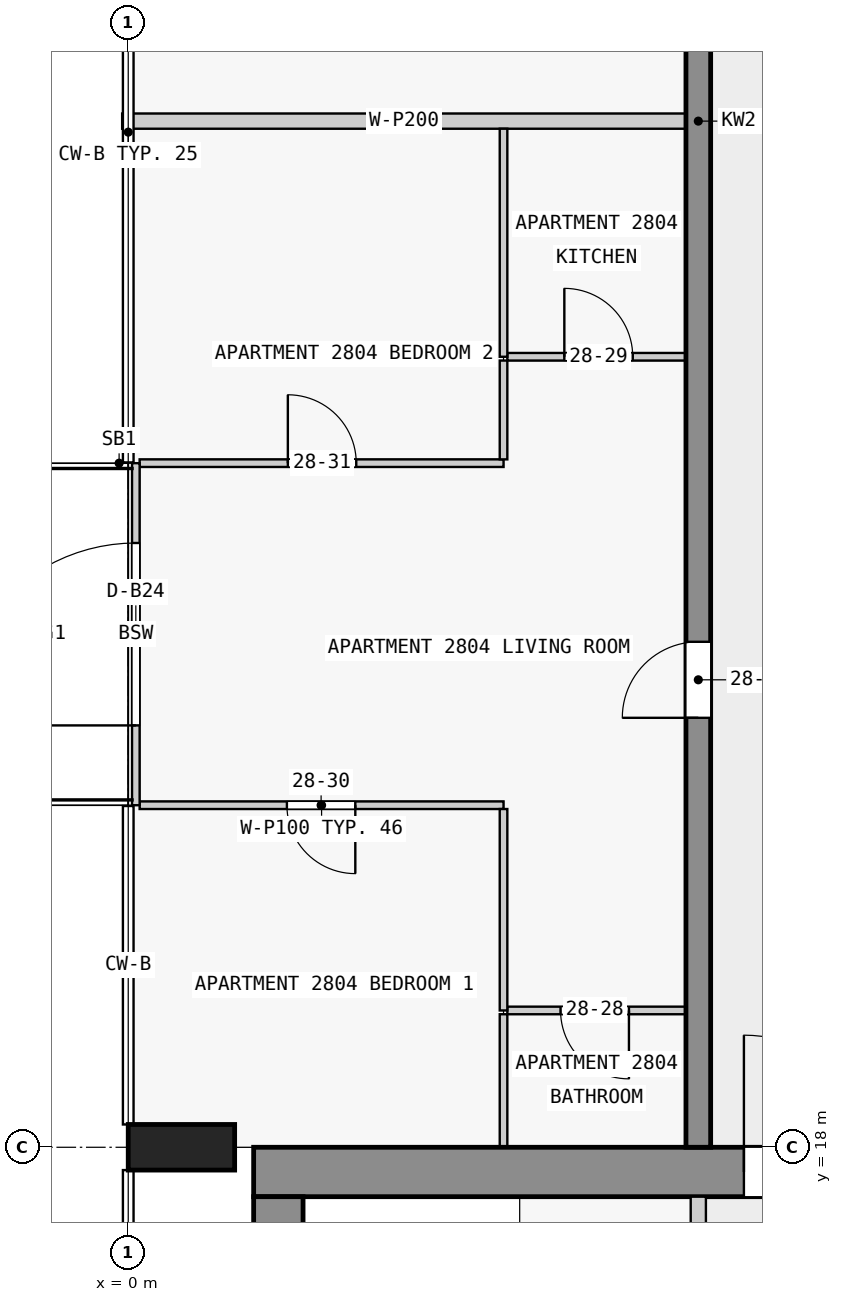
"""IFC4 building model, lengths in metres.
Left out: names, types, materials, properties, quantities, classifications, styles, units other than length and angle.
Written with IfcOpenShell. Run it as: python <this file> out.ifc"""

import sys

from ifc_helpers import new_model, si_unit, direction, frame, frame_2d, origin, origin_2d, place, context, subcontext, project, spatial, rectangle, extrude, element, fill, save


model = new_model("IFC4")
c1 = context("Model", 3, precision=1e-05, world=origin(), true_north=direction((0.0, 1.0)))
c2 = subcontext(c1, "Body", "Model", "MODEL_VIEW")
j1 = project(units=[si_unit("LENGTHUNIT", "METRE"), si_unit("PLANEANGLEUNIT", "RADIAN")], contexts=[c1])
p1 = place(None, origin())
s1 = spatial("IfcSite", under=j1, at=p1, CompositionType="ELEMENT")
p2 = place(p1, origin())
s2 = spatial("IfcBuilding", under=s1, at=p2, CompositionType="ELEMENT")
p3 = place(p2, frame((0.0, 0.0, 109.8)))
s3 = spatial("IfcBuildingStorey", under=s2, at=p3, CompositionType="ELEMENT", Elevation=109.8)
p4 = place(p3, frame((0.7, 18.0, 0.0), z_axis=(0.0, 0.0, 1.0), x_axis=(0.0, 1.0, 0.0)))
e1 = element("IfcColumn", 1, at=p4, inside=s3, PredefinedType="COLUMN", context=c2, shape_type="SweptSolid", body=[
    extrude(rectangle(XDim=0.6, YDim=1.4, at=origin_2d()), origin(), (0.0, 0.0, 1.0), 3.5),
])
p5 = place(p3, frame((1.65, 17.675, 0.0), z_axis=(0.0, 0.0, 1.0), x_axis=(1.0, 0.0, 0.0)))
e2 = element("IfcWall", 2, at=p5, inside=s3, PredefinedType="SHEAR", context=c2, shape_type="SweptSolid", body=[
    extrude(rectangle(XDim=20.85, YDim=0.65, at=frame_2d((10.425, 0.0))), origin(), (0.0, 0.0, 1.0), 3.25),
])
p6 = place(p5, frame((6.45, 0.0, 0.0)))
e3 = element("IfcOpeningElement", 3, at=p6, cuts=e2, PredefinedType="OPENING", context=c2, shape_type="SweptSolid", body=[
    extrude(rectangle(XDim=1.8, YDim=2.1, at=frame_2d((0.9, 1.05))), frame((0.0, 0.335, 0.0), z_axis=(0.0, -1.0, 0.0), x_axis=(1.0, 0.0, 0.0)), (0.0, 0.0, 1.0), 0.67),
])
p7 = place(p3, frame((1.975, 2.5, 0.0), z_axis=(0.0, 0.0, 1.0), x_axis=(0.0, 1.0, 0.0)))
e4 = element("IfcWall", 4, at=p7, inside=s3, PredefinedType="SHEAR", context=c2, shape_type="SweptSolid", body=[
    extrude(rectangle(XDim=14.85, YDim=0.65, at=frame_2d((7.425, 0.0))), origin(), (0.0, 0.0, 1.0), 3.25),
])
p8 = place(p3, frame((7.5, 18.0, 0.0), z_axis=(0.0, 0.0, 1.0), x_axis=(0.0, 1.0, 0.0)))
e5 = element("IfcWall", 5, at=p8, inside=s3, PredefinedType="SHEAR", context=c2, shape_type="SweptSolid", body=[
    extrude(rectangle(XDim=27.0, YDim=0.325, at=frame_2d((13.5, 0.0))), origin(), (0.0, 0.0, 1.0), 3.25),
])
p9 = place(p8, frame((5.65, 0.0, 0.0)))
e6 = element("IfcOpeningElement", 6, at=p9, cuts=e5, PredefinedType="OPENING", context=c2, shape_type="SweptSolid", body=[
    extrude(rectangle(XDim=1.0, YDim=2.1, at=frame_2d((0.5, 1.05))), frame((0.0, 0.172, 0.0), z_axis=(0.0, -1.0, 0.0), x_axis=(1.0, 0.0, 0.0)), (0.0, 0.0, 1.0), 0.345),
])
p10 = place(p8, frame((15.35, 0.0, 0.0)))
e7 = element("IfcOpeningElement", 7, at=p10, cuts=e5, PredefinedType="OPENING", context=c2, shape_type="SweptSolid", body=[
    extrude(rectangle(XDim=0.9, YDim=2.1, at=frame_2d((0.45, 1.05))), frame((0.0, 0.172, 0.0), z_axis=(0.0, -1.0, 0.0), x_axis=(1.0, 0.0, 0.0)), (0.0, 0.0, 1.0), 0.345),
])
p11 = place(p8, frame((21.35, 0.0, 0.0)))
e8 = element("IfcOpeningElement", 8, at=p11, cuts=e5, PredefinedType="OPENING", context=c2, shape_type="SweptSolid", body=[
    extrude(rectangle(XDim=1.0, YDim=2.1, at=frame_2d((0.5, 1.05))), frame((0.0, 0.172, 0.0), z_axis=(0.0, -1.0, 0.0), x_axis=(1.0, 0.0, 0.0)), (0.0, 0.0, 1.0), 0.345),
])
p12 = place(p3, frame((0.1, 22.5, 0.0), z_axis=(0.0, 0.0, 1.0), x_axis=(0.0, 1.0, 0.0)))
e9 = element("IfcWall", 9, at=p12, inside=s3, PredefinedType="STANDARD", context=c2, shape_type="SweptSolid", body=[
    extrude(rectangle(XDim=4.5, YDim=0.1, at=frame_2d((2.25, 0.0))), origin(), (0.0, 0.0, 1.0), 3.25),
])
p13 = place(p12, frame((1.05, 0.0, 0.0)))
e10 = element("IfcOpeningElement", 10, at=p13, cuts=e9, PredefinedType="OPENING", context=c2, shape_type="SweptSolid", body=[
    extrude(rectangle(XDim=2.4, YDim=2.4, at=frame_2d((1.2, 1.2))), frame((0.0, 0.06, 0.0), z_axis=(0.0, -1.0, 0.0), x_axis=(1.0, 0.0, 0.0)), (0.0, 0.0, 1.0), 0.12),
])
p14 = place(p3, frame((7.5, 10.1, 0.0), z_axis=(0.0, 0.0, 1.0), x_axis=(0.0, 1.0, 0.0)))
e11 = element("IfcWall", 11, at=p14, inside=s3, PredefinedType="PARTITIONING", context=c2, shape_type="SweptSolid", body=[
    extrude(rectangle(XDim=7.25, YDim=0.2, at=frame_2d((3.625, 0.0))), origin(), (0.0, 0.0, 1.0), 3.25),
])
p15 = place(p14, frame((0.775, 0.0, 0.0)))
e12 = element("IfcOpeningElement", 12, at=p15, cuts=e11, PredefinedType="OPENING", context=c2, shape_type="SweptSolid", body=[
    extrude(rectangle(XDim=0.9, YDim=2.1, at=frame_2d((0.45, 1.05))), frame((0.0, 0.11, 0.0), z_axis=(0.0, -1.0, 0.0), x_axis=(1.0, 0.0, 0.0)), (0.0, 0.0, 1.0), 0.22),
])
p16 = place(p14, frame((3.225, 0.0, 0.0)))
e13 = element("IfcOpeningElement", 13, at=p16, cuts=e11, PredefinedType="OPENING", context=c2, shape_type="SweptSolid", body=[
    extrude(rectangle(XDim=0.9, YDim=2.1, at=frame_2d((0.45, 1.05))), frame((0.0, 0.11, 0.0), z_axis=(0.0, -1.0, 0.0), x_axis=(1.0, 0.0, 0.0)), (0.0, 0.0, 1.0), 0.22),
])
p17 = place(p14, frame((5.25, 0.0, 0.0)))
e14 = element("IfcOpeningElement", 14, at=p17, cuts=e11, PredefinedType="OPENING", context=c2, shape_type="SweptSolid", body=[
    extrude(rectangle(XDim=0.9, YDim=2.1, at=frame_2d((0.45, 1.05))), frame((0.0, 0.11, 0.0), z_axis=(0.0, -1.0, 0.0), x_axis=(1.0, 0.0, 0.0)), (0.0, 0.0, 1.0), 0.22),
])
p18 = place(p3, frame((7.337, 19.8, 0.0), z_axis=(0.0, 0.0, 1.0), x_axis=(-1.0, 0.0, 0.0)))
e15 = element("IfcWall", 15, at=p18, inside=s3, PredefinedType="PARTITIONING", context=c2, shape_type="SweptSolid", body=[
    extrude(rectangle(XDim=2.35, YDim=0.1, at=frame_2d((1.175, 0.0))), origin(), (0.0, 0.0, 1.0), 3.25),
])
p19 = place(p18, frame((0.75, 0.0, 0.0)))
e16 = element("IfcOpeningElement", 16, at=p19, cuts=e15, PredefinedType="OPENING", context=c2, shape_type="SweptSolid", body=[
    extrude(rectangle(XDim=0.9, YDim=2.1, at=frame_2d((0.45, 1.05))), frame((0.0, 0.06, 0.0), z_axis=(0.0, -1.0, 0.0), x_axis=(1.0, 0.0, 0.0)), (0.0, 0.0, 1.0), 0.12),
])
p20 = place(p3, frame((4.938, 22.5, 0.0), z_axis=(0.0, 0.0, 1.0), x_axis=(-1.0, 0.0, 0.0)))
e17 = element("IfcWall", 17, at=p20, inside=s3, PredefinedType="PARTITIONING", context=c2, shape_type="SweptSolid", body=[
    extrude(rectangle(XDim=4.788, YDim=0.1, at=frame_2d((2.394, 0.0))), origin(), (0.0, 0.0, 1.0), 3.25),
])
p21 = place(p20, frame((1.95, 0.0, 0.0)))
e18 = element("IfcOpeningElement", 18, at=p21, cuts=e17, PredefinedType="OPENING", context=c2, shape_type="SweptSolid", body=[
    extrude(rectangle(XDim=0.9, YDim=2.1, at=frame_2d((0.45, 1.05))), frame((0.0, 0.06, 0.0), z_axis=(0.0, -1.0, 0.0), x_axis=(1.0, 0.0, 0.0)), (0.0, 0.0, 1.0), 0.12),
])
p22 = place(p3, frame((0.15, 27.0, 0.0), z_axis=(0.0, 0.0, 1.0), x_axis=(1.0, 0.0, 0.0)))
e19 = element("IfcWall", 19, at=p22, inside=s3, PredefinedType="PARTITIONING", context=c2, shape_type="SweptSolid", body=[
    extrude(rectangle(XDim=4.788, YDim=0.1, at=frame_2d((2.394, 0.0))), origin(), (0.0, 0.0, 1.0), 3.25),
])
p23 = place(p22, frame((1.95, 0.0, 0.0)))
e20 = element("IfcOpeningElement", 20, at=p23, cuts=e19, PredefinedType="OPENING", context=c2, shape_type="SweptSolid", body=[
    extrude(rectangle(XDim=0.9, YDim=2.1, at=frame_2d((0.45, 1.05))), frame((0.0, 0.06, 0.0), z_axis=(0.0, -1.0, 0.0), x_axis=(1.0, 0.0, 0.0)), (0.0, 0.0, 1.0), 0.12),
])
p24 = place(p3, frame((4.988, 28.4, 0.0), z_axis=(0.0, 0.0, 1.0), x_axis=(1.0, 0.0, 0.0)))
e21 = element("IfcWall", 21, at=p24, inside=s3, PredefinedType="PARTITIONING", context=c2, shape_type="SweptSolid", body=[
    extrude(rectangle(XDim=2.35, YDim=0.1, at=frame_2d((1.175, 0.0))), origin(), (0.0, 0.0, 1.0), 3.25),
])
p25 = place(p24, frame((0.75, 0.0, 0.0)))
e22 = element("IfcOpeningElement", 22, at=p25, cuts=e21, PredefinedType="OPENING", context=c2, shape_type="SweptSolid", body=[
    extrude(rectangle(XDim=0.9, YDim=2.1, at=frame_2d((0.45, 1.05))), frame((0.0, 0.06, 0.0), z_axis=(0.0, -1.0, 0.0), x_axis=(1.0, 0.0, 0.0)), (0.0, 0.0, 1.0), 0.12),
])
p26 = place(p3, frame((7.337, 31.5, 0.0), z_axis=(0.0, 0.0, 1.0), x_axis=(-1.0, 0.0, 0.0)))
e23 = element("IfcWall", 23, at=p26, inside=s3, PredefinedType="PARTITIONING", context=c2, shape_type="SweptSolid", body=[
    extrude(rectangle(XDim=7.417, YDim=0.2, at=frame_2d((3.709, 0.0))), origin(), (0.0, 0.0, 1.0), 3.25),
])
p27 = place(p3, frame((4.938, 19.75, 0.0), z_axis=(0.0, 0.0, 1.0), x_axis=(0.0, -1.0, 0.0)))
e24 = element("IfcWall", 24, at=p27, inside=s3, PredefinedType="PARTITIONING", context=c2, shape_type="SweptSolid", body=[
    extrude(rectangle(XDim=1.75, YDim=0.1, at=frame_2d((0.875, 0.0))), origin(), (0.0, 0.0, 1.0), 3.25),
])
p28 = place(p3, frame((4.938, 31.4, 0.0), z_axis=(0.0, 0.0, 1.0), x_axis=(0.0, -1.0, 0.0)))
e25 = element("IfcWall", 25, at=p28, inside=s3, PredefinedType="PARTITIONING", context=c2, shape_type="SweptSolid", body=[
    extrude(rectangle(XDim=3.0, YDim=0.1, at=frame_2d((1.5, 0.0))), origin(), (0.0, 0.0, 1.0), 3.25),
])
p29 = place(p3, frame((4.938, 19.8, 0.0), z_axis=(0.0, 0.0, 1.0), x_axis=(0.0, 1.0, 0.0)))
e26 = element("IfcWall", 26, at=p29, inside=s3, PredefinedType="PARTITIONING", context=c2, shape_type="SweptSolid", body=[
    extrude(rectangle(XDim=2.65, YDim=0.1, at=frame_2d((1.325, 0.0))), origin(), (0.0, 0.0, 1.0), 3.25),
])
p30 = place(p3, frame((4.938, 27.05, 0.0), z_axis=(0.0, 0.0, 1.0), x_axis=(0.0, 1.0, 0.0)))
e27 = element("IfcWall", 27, at=p30, inside=s3, PredefinedType="PARTITIONING", context=c2, shape_type="SweptSolid", body=[
    extrude(rectangle(XDim=1.3, YDim=0.1, at=frame_2d((0.65, 0.0))), origin(), (0.0, 0.0, 1.0), 3.25),
])
p31 = place(p13, origin())
e28 = element("IfcDoor", 28, at=p31, inside=s3, OperationType="SINGLE_SWING_LEFT", PredefinedType="DOOR", context=c2, shape_type="SweptSolid", body=[
    extrude(rectangle(XDim=2.4, YDim=2.4, at=frame_2d((1.2, 1.2))), frame((0.0, 0.025, 0.0), z_axis=(0.0, -1.0, 0.0), x_axis=(1.0, 0.0, 0.0)), (0.0, 0.0, 1.0), 0.05),
])
fill(e10, e28)
p32 = place(p6, origin())
e29 = element("IfcDoor", 29, at=p32, inside=s3, OperationType="DOUBLE_DOOR_SINGLE_SWING", PredefinedType="DOOR", context=c2, shape_type="SweptSolid", body=[
    extrude(rectangle(XDim=1.8, YDim=2.1, at=frame_2d((0.9, 1.05))), frame((0.0, 0.025, 0.0), z_axis=(0.0, -1.0, 0.0), x_axis=(1.0, 0.0, 0.0)), (0.0, 0.0, 1.0), 0.05),
])
fill(e3, e29)
p33 = place(p9, origin())
e30 = element("IfcDoor", 30, at=p33, inside=s3, OperationType="SINGLE_SWING_LEFT", PredefinedType="DOOR", context=c2, shape_type="SweptSolid", body=[
    extrude(rectangle(XDim=1.0, YDim=2.1, at=frame_2d((0.5, 1.05))), frame((0.0, 0.025, 0.0), z_axis=(0.0, -1.0, 0.0), x_axis=(1.0, 0.0, 0.0)), (0.0, 0.0, 1.0), 0.05),
])
fill(e6, e30)
p34 = place(p19, origin())
e31 = element("IfcDoor", 31, at=p34, inside=s3, OperationType="SINGLE_SWING_RIGHT", PredefinedType="DOOR", context=c2, shape_type="SweptSolid", body=[
    extrude(rectangle(XDim=0.9, YDim=2.1, at=frame_2d((0.45, 1.05))), frame((0.0, 0.025, 0.0), z_axis=(0.0, -1.0, 0.0), x_axis=(1.0, 0.0, 0.0)), (0.0, 0.0, 1.0), 0.05),
])
fill(e16, e31)
p35 = place(p25, origin())
e32 = element("IfcDoor", 32, at=p35, inside=s3, OperationType="SINGLE_SWING_RIGHT", PredefinedType="DOOR", context=c2, shape_type="SweptSolid", body=[
    extrude(rectangle(XDim=0.9, YDim=2.1, at=frame_2d((0.45, 1.05))), frame((0.0, 0.025, 0.0), z_axis=(0.0, -1.0, 0.0), x_axis=(1.0, 0.0, 0.0)), (0.0, 0.0, 1.0), 0.05),
])
fill(e22, e32)
p36 = place(p21, origin())
e33 = element("IfcDoor", 33, at=p36, inside=s3, OperationType="SINGLE_SWING_RIGHT", PredefinedType="DOOR", context=c2, shape_type="SweptSolid", body=[
    extrude(rectangle(XDim=0.9, YDim=2.1, at=frame_2d((0.45, 1.05))), frame((0.0, 0.025, 0.0), z_axis=(0.0, -1.0, 0.0), x_axis=(1.0, 0.0, 0.0)), (0.0, 0.0, 1.0), 0.05),
])
fill(e18, e33)
p37 = place(p23, origin())
e34 = element("IfcDoor", 34, at=p37, inside=s3, OperationType="SINGLE_SWING_RIGHT", PredefinedType="DOOR", context=c2, shape_type="SweptSolid", body=[
    extrude(rectangle(XDim=0.9, YDim=2.1, at=frame_2d((0.45, 1.05))), frame((0.0, 0.025, 0.0), z_axis=(0.0, -1.0, 0.0), x_axis=(1.0, 0.0, 0.0)), (0.0, 0.0, 1.0), 0.05),
])
fill(e20, e34)
save(model, sys.argv[1])
